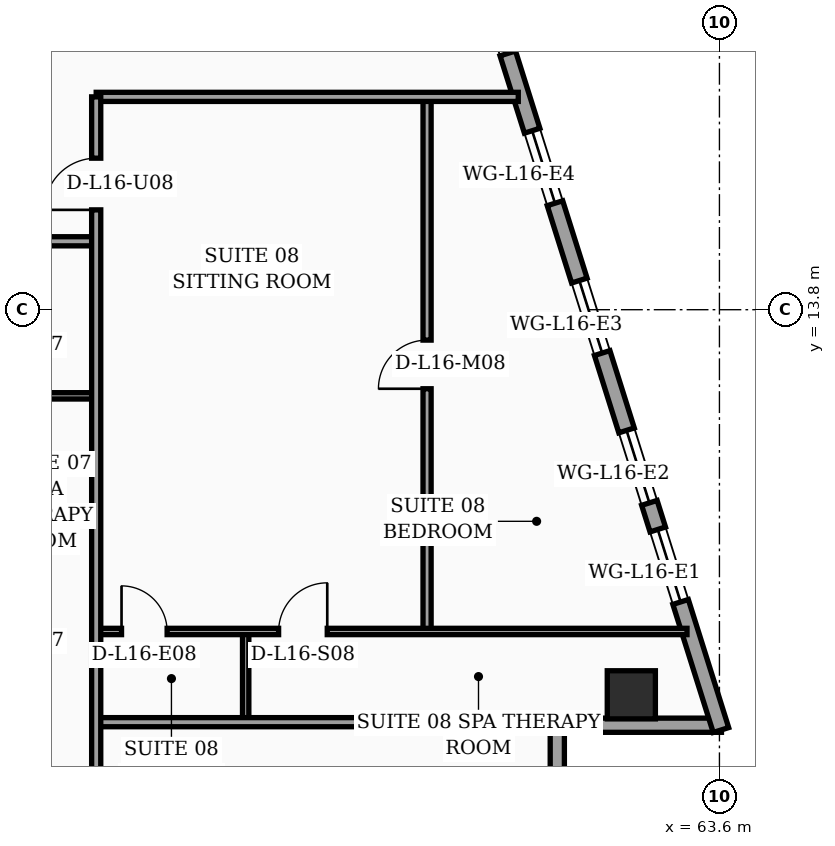
"""IFC4 building model, lengths in metres.
Left out: names, types, materials, properties, quantities, classifications, styles, units other than length and angle.
Written with IfcOpenShell. Run it as: python <this file> out.ifc"""

import sys

from ifc_helpers import new_model, si_unit, direction, frame, frame_2d, origin, origin_2d, place, context, subcontext, project, spatial, rectangle, hollow_rectangle, extrude, element, fill, save


model = new_model("IFC4")
c1 = context("Model", 3, precision=1e-05, world=origin(), true_north=direction((0.0, 1.0)))
c2 = subcontext(c1, "Body", "Model", "MODEL_VIEW")
j1 = project(units=[si_unit("LENGTHUNIT", "METRE"), si_unit("PLANEANGLEUNIT", "RADIAN")], contexts=[c1])
p1 = place(None, origin())
s1 = spatial("IfcSite", under=j1, at=p1, CompositionType="ELEMENT")
p2 = place(p1, origin())
s2 = spatial("IfcBuilding", under=s1, at=p2, CompositionType="ELEMENT")
p3 = place(p2, frame((0.0, 0.0, 69.8)))
s3 = spatial("IfcBuildingStorey", under=s2, at=p3, CompositionType="ELEMENT", Elevation=69.8)
p4 = place(p3, frame((61.861, 6.2, 0.0), z_axis=(0.0, 0.0, 1.0), x_axis=(1.0, 0.0, 0.0)))
e1 = element("IfcColumn", 1, at=p4, inside=s3, PredefinedType="COLUMN", context=c2, shape_type="SweptSolid", body=[
    extrude(hollow_rectangle(XDim=0.95, YDim=0.95, WallThickness=0.04, at=origin_2d()), origin(), (0.0, 0.0, 1.0), 3.56),
])
p5 = place(p3, frame((60.4, 2.52, 0.0), z_axis=(0.0, 0.0, 1.0), x_axis=(0.0, 1.0, 0.0)))
e2 = element("IfcWall", 2, at=p5, inside=s3, PredefinedType="SOLIDWALL", context=c2, shape_type="SweptSolid", body=[
    extrude(rectangle(XDim=2.94, YDim=0.28, at=frame_2d((1.47, 0.0))), origin(), (0.0, 0.0, 1.0), 3.04),
])
p6 = place(p3, frame((60.26, 5.6, 0.0), z_axis=(0.0, 0.0, 1.0), x_axis=(1.0, 0.0, 0.0)))
e3 = element("IfcWall", 3, at=p6, inside=s3, PredefinedType="SOLIDWALL", context=c2, shape_type="SweptSolid", body=[
    extrude(rectangle(XDim=3.38, YDim=0.28, at=frame_2d((1.69, 0.0))), origin(), (0.0, 0.0, 1.0), 3.04),
])
p7 = place(p3, frame((63.63, 5.505, 0.0), z_axis=(0.0, 0.0, 1.0), x_axis=(-0.300501856448, 0.953781229775, 0.0)))
e4 = element("IfcWall", 4, at=p7, inside=s3, PredefinedType="SOLIDWALL", context=c2, shape_type="SweptSolid", body=[
    extrude(rectangle(XDim=30.814, YDim=0.32, at=frame_2d((15.407, 0.0))), origin(), (0.0, 0.0, 1.0), 3.56),
])
p8 = place(p7, frame((18.796, 0.0, 0.0)))
e5 = element("IfcOpeningElement", 5, at=p8, cuts=e4, PredefinedType="OPENING", context=c2, shape_type="SweptSolid", body=[
    extrude(rectangle(XDim=1.4, YDim=2.25, at=frame_2d((0.7, 1.125))), frame((0.0, 0.17, 0.0), z_axis=(0.0, -1.0, 0.0), x_axis=(1.0, 0.0, 0.0)), (0.0, 0.0, 1.0), 0.34),
])
p9 = place(p7, frame((2.65, 0.0, 0.75)))
e6 = element("IfcOpeningElement", 6, at=p9, cuts=e4, PredefinedType="OPENING", context=c2, shape_type="SweptSolid", body=[
    extrude(rectangle(XDim=1.5, YDim=1.6, at=frame_2d((0.75, 0.8))), frame((0.0, 0.17, 0.0), z_axis=(0.0, -1.0, 0.0), x_axis=(1.0, 0.0, 0.0)), (0.0, 0.0, 1.0), 0.34),
])
p10 = place(p7, frame((4.7, 0.0, 0.75)))
e7 = element("IfcOpeningElement", 7, at=p10, cuts=e4, PredefinedType="OPENING", context=c2, shape_type="SweptSolid", body=[
    extrude(rectangle(XDim=1.5, YDim=1.6, at=frame_2d((0.75, 0.8))), frame((0.0, 0.17, 0.0), z_axis=(0.0, -1.0, 0.0), x_axis=(1.0, 0.0, 0.0)), (0.0, 0.0, 1.0), 0.34),
])
p11 = place(p7, frame((7.8, 0.0, 0.75)))
e8 = element("IfcOpeningElement", 8, at=p11, cuts=e4, PredefinedType="OPENING", context=c2, shape_type="SweptSolid", body=[
    extrude(rectangle(XDim=1.5, YDim=1.6, at=frame_2d((0.75, 0.8))), frame((0.0, 0.17, 0.0), z_axis=(0.0, -1.0, 0.0), x_axis=(1.0, 0.0, 0.0)), (0.0, 0.0, 1.0), 0.34),
])
p12 = place(p7, frame((10.9, 0.0, 0.75)))
e9 = element("IfcOpeningElement", 9, at=p12, cuts=e4, PredefinedType="OPENING", context=c2, shape_type="SweptSolid", body=[
    extrude(rectangle(XDim=1.5, YDim=1.6, at=frame_2d((0.75, 0.8))), frame((0.0, 0.17, 0.0), z_axis=(0.0, -1.0, 0.0), x_axis=(1.0, 0.0, 0.0)), (0.0, 0.0, 1.0), 0.34),
])
p13 = place(p7, frame((14.0, 0.0, 0.75)))
e10 = element("IfcOpeningElement", 10, at=p13, cuts=e4, PredefinedType="OPENING", context=c2, shape_type="SweptSolid", body=[
    extrude(rectangle(XDim=1.5, YDim=1.6, at=frame_2d((0.75, 0.8))), frame((0.0, 0.17, 0.0), z_axis=(0.0, -1.0, 0.0), x_axis=(1.0, 0.0, 0.0)), (0.0, 0.0, 1.0), 0.34),
])
p14 = place(p7, frame((16.55, 0.0, 0.75)))
e11 = element("IfcOpeningElement", 11, at=p14, cuts=e4, PredefinedType="OPENING", context=c2, shape_type="SweptSolid", body=[
    extrude(rectangle(XDim=1.5, YDim=1.6, at=frame_2d((0.75, 0.8))), frame((0.0, 0.17, 0.0), z_axis=(0.0, -1.0, 0.0), x_axis=(1.0, 0.0, 0.0)), (0.0, 0.0, 1.0), 0.34),
])
p15 = place(p7, frame((20.75, 0.0, 0.75)))
e12 = element("IfcOpeningElement", 12, at=p15, cuts=e4, PredefinedType="OPENING", context=c2, shape_type="SweptSolid", body=[
    extrude(rectangle(XDim=1.5, YDim=1.6, at=frame_2d((0.75, 0.8))), frame((0.0, 0.17, 0.0), z_axis=(0.0, -1.0, 0.0), x_axis=(1.0, 0.0, 0.0)), (0.0, 0.0, 1.0), 0.34),
])
p16 = place(p7, frame((23.3, 0.0, 0.75)))
e13 = element("IfcOpeningElement", 13, at=p16, cuts=e4, PredefinedType="OPENING", context=c2, shape_type="SweptSolid", body=[
    extrude(rectangle(XDim=1.5, YDim=1.6, at=frame_2d((0.75, 0.8))), frame((0.0, 0.17, 0.0), z_axis=(0.0, -1.0, 0.0), x_axis=(1.0, 0.0, 0.0)), (0.0, 0.0, 1.0), 0.34),
])
p17 = place(p7, frame((26.4, 0.0, 0.75)))
e14 = element("IfcOpeningElement", 14, at=p17, cuts=e4, PredefinedType="OPENING", context=c2, shape_type="SweptSolid", body=[
    extrude(rectangle(XDim=1.5, YDim=1.6, at=frame_2d((0.75, 0.8))), frame((0.0, 0.17, 0.0), z_axis=(0.0, -1.0, 0.0), x_axis=(1.0, 0.0, 0.0)), (0.0, 0.0, 1.0), 0.34),
])
p18 = place(p3, frame((49.17, 12.1, 0.0), z_axis=(0.0, 0.0, 1.0), x_axis=(1.0, 0.0, 0.0)))
e15 = element("IfcWall", 15, at=p18, inside=s3, PredefinedType="PARTITIONING", context=c2, shape_type="SweptSolid", body=[
    extrude(rectangle(XDim=2.13, YDim=0.125, at=frame_2d((1.065, 0.0))), origin(), (0.0, 0.0, 1.0), 3.56),
])
p19 = place(p3, frame((32.4, 15.15, 0.0), z_axis=(0.0, 0.0, 1.0), x_axis=(1.0, 0.0, 0.0)))
e16 = element("IfcWall", 16, at=p19, inside=s3, PredefinedType="PARTITIONING", context=c2, shape_type="SweptSolid", body=[
    extrude(rectangle(XDim=18.9, YDim=0.18, at=frame_2d((9.45, 0.0))), origin(), (0.0, 0.0, 1.0), 2.84),
])
p20 = place(p19, frame((3.55, 0.0, 0.0)))
e17 = element("IfcOpeningElement", 17, at=p20, cuts=e16, PredefinedType="OPENING", context=c2, shape_type="SweptSolid", body=[
    extrude(rectangle(XDim=1.02, YDim=2.2, at=frame_2d((0.51, 1.1))), frame((0.0, 0.1, 0.0), z_axis=(0.0, -1.0, 0.0), x_axis=(1.0, 0.0, 0.0)), (0.0, 0.0, 1.0), 0.2),
])
p21 = place(p19, frame((12.9, 0.0, 0.0)))
e18 = element("IfcOpeningElement", 18, at=p21, cuts=e16, PredefinedType="OPENING", context=c2, shape_type="SweptSolid", body=[
    extrude(rectangle(XDim=1.02, YDim=2.2, at=frame_2d((0.51, 1.1))), frame((0.0, 0.1, 0.0), z_axis=(0.0, -1.0, 0.0), x_axis=(1.0, 0.0, 0.0)), (0.0, 0.0, 1.0), 0.2),
])
p22 = place(p3, frame((54.25, 5.66, 0.0), z_axis=(0.0, 0.0, 1.0), x_axis=(0.0, 1.0, 0.0)))
e19 = element("IfcWall", 19, at=p22, inside=s3, PredefinedType="PARTITIONING", context=c2, shape_type="SweptSolid", body=[
    extrude(rectangle(XDim=1.79, YDim=0.125, at=frame_2d((0.895, 0.0))), origin(), (0.0, 0.0, 1.0), 3.56),
])
p23 = place(p3, frame((57.83, 7.45, 0.0), z_axis=(0.0, 0.0, 1.0), x_axis=(0.0, 1.0, 0.0)))
e20 = element("IfcWall", 20, at=p23, inside=s3, PredefinedType="PARTITIONING", context=c2, shape_type="SweptSolid", body=[
    extrude(rectangle(XDim=10.55, YDim=0.16, at=frame_2d((5.275, 0.0))), origin(), (0.0, 0.0, 1.0), 3.04),
])
p24 = place(p23, frame((4.79, 0.0, 0.0)))
e21 = element("IfcOpeningElement", 21, at=p24, cuts=e20, PredefinedType="OPENING", context=c2, shape_type="SweptSolid", body=[
    extrude(rectangle(XDim=0.96, YDim=2.2, at=frame_2d((0.48, 1.1))), frame((0.0, 0.09, 0.0), z_axis=(0.0, -1.0, 0.0), x_axis=(1.0, 0.0, 0.0)), (0.0, 0.0, 1.0), 0.18),
])
p25 = place(p3, frame((51.3, 7.45, 0.0), z_axis=(0.0, 0.0, 1.0), x_axis=(1.0, 0.0, 0.0)))
e22 = element("IfcWall", 22, at=p25, inside=s3, PredefinedType="PARTITIONING", context=c2, shape_type="SweptSolid", body=[
    extrude(rectangle(XDim=11.66, YDim=0.125, at=frame_2d((5.83, 0.0))), origin(), (0.0, 0.0, 1.0), 3.04),
])
p26 = place(p25, frame((0.5, 0.0, 0.0)))
e23 = element("IfcOpeningElement", 23, at=p26, cuts=e22, PredefinedType="OPENING", context=c2, shape_type="SweptSolid", body=[
    extrude(rectangle(XDim=0.9, YDim=2.15, at=frame_2d((0.45, 1.075))), frame((0.0, 0.073, 0.0), z_axis=(0.0, -1.0, 0.0), x_axis=(1.0, 0.0, 0.0)), (0.0, 0.0, 1.0), 0.145),
])
p27 = place(p25, frame((3.6, 0.0, 0.0)))
e24 = element("IfcOpeningElement", 24, at=p27, cuts=e22, PredefinedType="OPENING", context=c2, shape_type="SweptSolid", body=[
    extrude(rectangle(XDim=0.96, YDim=2.2, at=frame_2d((0.48, 1.1))), frame((0.0, 0.073, 0.0), z_axis=(0.0, -1.0, 0.0), x_axis=(1.0, 0.0, 0.0)), (0.0, 0.0, 1.0), 0.145),
])
p28 = place(p3, frame((51.3, 5.66, 0.0), z_axis=(0.0, 0.0, 1.0), x_axis=(1.0, 0.0, 0.0)))
e25 = element("IfcWall", 25, at=p28, inside=s3, PredefinedType="PARTITIONING", context=c2, shape_type="SweptSolid", body=[
    extrude(rectangle(XDim=9.1, YDim=0.18, at=frame_2d((4.55, 0.0))), origin(), (0.0, 0.0, 1.0), 3.04),
])
p29 = place(p3, frame((51.3, 18.0, 0.0), z_axis=(0.0, 0.0, 1.0), x_axis=(1.0, 0.0, 0.0)))
e26 = element("IfcWall", 26, at=p29, inside=s3, PredefinedType="PARTITIONING", context=c2, shape_type="SweptSolid", body=[
    extrude(rectangle(XDim=8.33, YDim=0.18, at=frame_2d((4.165, 0.0))), origin(), (0.0, 0.0, 1.0), 3.04),
])
p30 = place(p3, frame((51.3, 2.44, 0.0), z_axis=(0.0, 0.0, 1.0), x_axis=(0.0, 1.0, 0.0)))
e27 = element("IfcWall", 27, at=p30, inside=s3, PredefinedType="PARTITIONING", context=c2, shape_type="SweptSolid", body=[
    extrude(rectangle(XDim=15.56, YDim=0.18, at=frame_2d((7.78, 0.0))), origin(), (0.0, 0.0, 1.0), 3.04),
])
p31 = place(p30, frame((13.33, 0.0, 0.0)))
e28 = element("IfcOpeningElement", 28, at=p31, cuts=e27, PredefinedType="OPENING", context=c2, shape_type="SweptSolid", body=[
    extrude(rectangle(XDim=1.02, YDim=2.2, at=frame_2d((0.51, 1.1))), frame((0.0, 0.1, 0.0), z_axis=(0.0, -1.0, 0.0), x_axis=(1.0, 0.0, 0.0)), (0.0, 0.0, 1.0), 0.2),
])
p32 = place(p9, origin())
e29 = element("IfcWindow", 29, at=p32, inside=s3, PartitioningType="SINGLE_PANEL", PredefinedType="WINDOW", context=c2, shape_type="SweptSolid", body=[
    extrude(rectangle(XDim=1.5, YDim=1.6, at=frame_2d((0.75, 0.8))), frame((0.0, 0.03, 0.0), z_axis=(0.0, -1.0, 0.0), x_axis=(1.0, 0.0, 0.0)), (0.0, 0.0, 1.0), 0.06),
])
fill(e6, e29)
p33 = place(p10, origin())
e30 = element("IfcWindow", 30, at=p33, inside=s3, PartitioningType="SINGLE_PANEL", PredefinedType="WINDOW", context=c2, shape_type="SweptSolid", body=[
    extrude(rectangle(XDim=1.5, YDim=1.6, at=frame_2d((0.75, 0.8))), frame((0.0, 0.03, 0.0), z_axis=(0.0, -1.0, 0.0), x_axis=(1.0, 0.0, 0.0)), (0.0, 0.0, 1.0), 0.06),
])
fill(e7, e30)
p34 = place(p11, origin())
e31 = element("IfcWindow", 31, at=p34, inside=s3, PartitioningType="SINGLE_PANEL", PredefinedType="WINDOW", context=c2, shape_type="SweptSolid", body=[
    extrude(rectangle(XDim=1.5, YDim=1.6, at=frame_2d((0.75, 0.8))), frame((0.0, 0.03, 0.0), z_axis=(0.0, -1.0, 0.0), x_axis=(1.0, 0.0, 0.0)), (0.0, 0.0, 1.0), 0.06),
])
fill(e8, e31)
p35 = place(p12, origin())
e32 = element("IfcWindow", 32, at=p35, inside=s3, PartitioningType="SINGLE_PANEL", PredefinedType="WINDOW", context=c2, shape_type="SweptSolid", body=[
    extrude(rectangle(XDim=1.5, YDim=1.6, at=frame_2d((0.75, 0.8))), frame((0.0, 0.03, 0.0), z_axis=(0.0, -1.0, 0.0), x_axis=(1.0, 0.0, 0.0)), (0.0, 0.0, 1.0), 0.06),
])
fill(e9, e32)
p36 = place(p13, origin())
e33 = element("IfcWindow", 33, at=p36, inside=s3, PartitioningType="SINGLE_PANEL", PredefinedType="WINDOW", context=c2, shape_type="SweptSolid", body=[
    extrude(rectangle(XDim=1.5, YDim=1.6, at=frame_2d((0.75, 0.8))), frame((0.0, 0.03, 0.0), z_axis=(0.0, -1.0, 0.0), x_axis=(1.0, 0.0, 0.0)), (0.0, 0.0, 1.0), 0.06),
])
fill(e10, e33)
p37 = place(p24, origin())
e34 = element("IfcDoor", 34, at=p37, inside=s3, OperationType="SINGLE_SWING_LEFT", PredefinedType="DOOR", context=c2, shape_type="SweptSolid", body=[
    extrude(rectangle(XDim=0.96, YDim=2.2, at=frame_2d((0.48, 1.1))), frame((0.0, 0.025, 0.0), z_axis=(0.0, -1.0, 0.0), x_axis=(1.0, 0.0, 0.0)), (0.0, 0.0, 1.0), 0.05),
])
fill(e21, e34)
p38 = place(p26, origin())
e35 = element("IfcDoor", 35, at=p38, inside=s3, OperationType="SINGLE_SWING_LEFT", PredefinedType="DOOR", context=c2, shape_type="SweptSolid", body=[
    extrude(rectangle(XDim=0.9, YDim=2.15, at=frame_2d((0.45, 1.075))), frame((0.0, 0.025, 0.0), z_axis=(0.0, -1.0, 0.0), x_axis=(1.0, 0.0, 0.0)), (0.0, 0.0, 1.0), 0.05),
])
fill(e23, e35)
p39 = place(p27, origin())
e36 = element("IfcDoor", 36, at=p39, inside=s3, OperationType="SINGLE_SWING_RIGHT", PredefinedType="DOOR", context=c2, shape_type="SweptSolid", body=[
    extrude(rectangle(XDim=0.96, YDim=2.2, at=frame_2d((0.48, 1.1))), frame((0.0, 0.025, 0.0), z_axis=(0.0, -1.0, 0.0), x_axis=(1.0, 0.0, 0.0)), (0.0, 0.0, 1.0), 0.05),
])
fill(e24, e36)
p40 = place(p31, origin())
e37 = element("IfcDoor", 37, at=p40, inside=s3, OperationType="SINGLE_SWING_LEFT", PredefinedType="DOOR", context=c2, shape_type="SweptSolid", body=[
    extrude(rectangle(XDim=1.02, YDim=2.2, at=frame_2d((0.51, 1.1))), frame((0.0, 0.025, 0.0), z_axis=(0.0, -1.0, 0.0), x_axis=(1.0, 0.0, 0.0)), (0.0, 0.0, 1.0), 0.05),
])
fill(e28, e37)
save(model, sys.argv[1])
